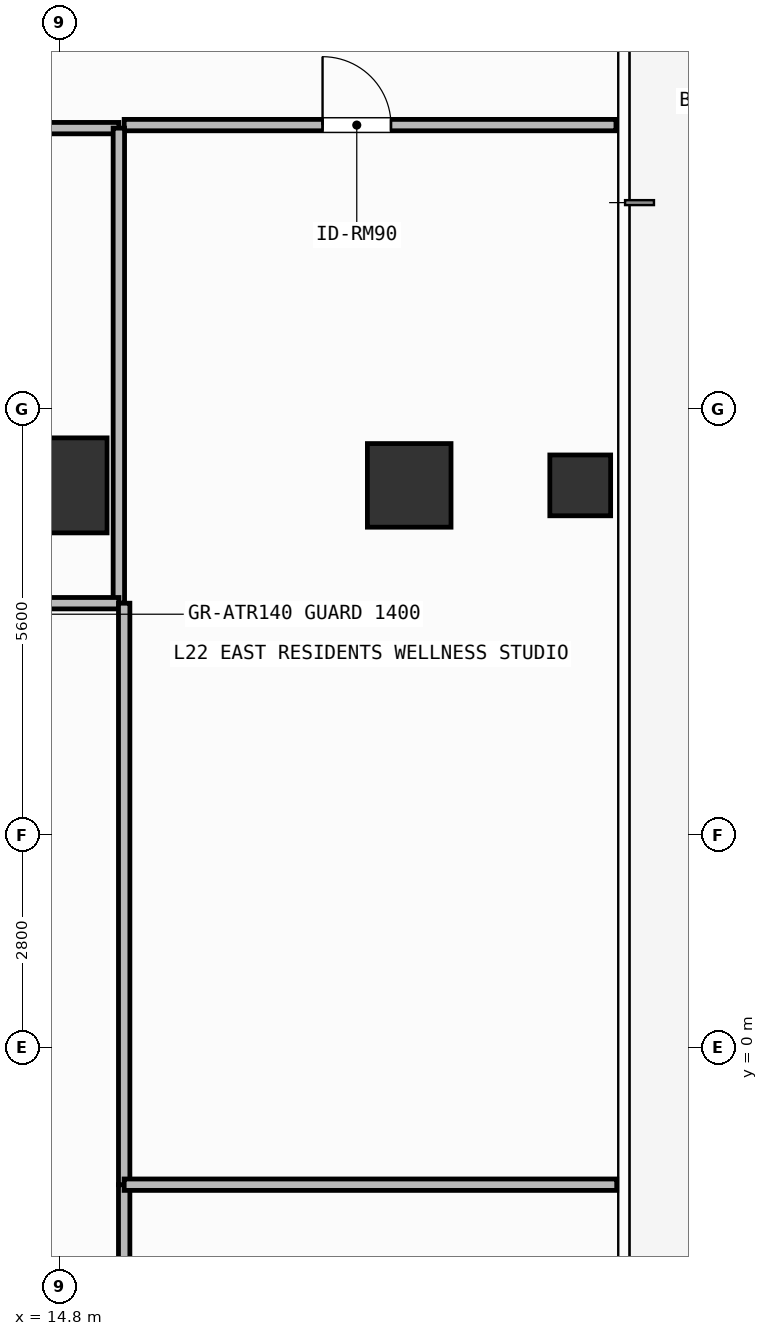
"""IFC4 building model, lengths in metres.
Left out: names, types, materials, properties, quantities, classifications, styles, units other than length and angle.
Written with IfcOpenShell. Run it as: python <this file> out.ifc"""

import sys

from ifc_helpers import new_model, si_unit, direction, frame, frame_2d, origin, origin_2d, place, context, subcontext, project, spatial, rectangle, hollow_rectangle, extrude, element, fill, save


model = new_model("IFC4")
c1 = context("Model", 3, precision=1e-05, world=origin(), true_north=direction((0.0, 1.0)))
c2 = subcontext(c1, "Body", "Model", "MODEL_VIEW")
j1 = project(units=[si_unit("LENGTHUNIT", "METRE"), si_unit("PLANEANGLEUNIT", "RADIAN")], contexts=[c1])
p1 = place(None, origin())
s1 = spatial("IfcSite", under=j1, at=p1, CompositionType="ELEMENT")
p2 = place(p1, origin())
s2 = spatial("IfcBuilding", under=s1, at=p2, CompositionType="ELEMENT")
p3 = place(p2, frame((0.0, 0.0, 89.1)))
s3 = spatial("IfcBuildingStorey", under=s2, at=p3, CompositionType="ELEMENT", Elevation=89.1)
p4 = place(p3, frame((14.8, 7.4, 0.0), z_axis=(0.0, 0.0, 1.0), x_axis=(1.0, 0.0, 0.0)))
e1 = element("IfcColumn", 1, at=p4, inside=s3, PredefinedType="COLUMN", context=c2, shape_type="SweptSolid", body=[
    extrude(rectangle(XDim=1.25, YDim=1.25, at=origin_2d()), origin(), (0.0, 0.0, 1.0), 3.9),
])
p5 = place(p3, frame((19.4, 7.4, 0.0), z_axis=(0.0, 0.0, 1.0), x_axis=(1.0, 0.0, 0.0)))
e2 = element("IfcColumn", 2, at=p5, inside=s3, PredefinedType="COLUMN", context=c2, shape_type="SweptSolid", body=[
    extrude(rectangle(XDim=1.1, YDim=1.1, at=origin_2d()), origin(), (0.0, 0.0, 1.0), 3.9),
])
p6 = place(p3, frame((21.65, 7.4, 0.0), z_axis=(0.0, 0.0, 1.0), x_axis=(1.0, 0.0, 0.0)))
e3 = element("IfcColumn", 3, at=p6, inside=s3, PredefinedType="COLUMN", context=c2, shape_type="SweptSolid", body=[
    extrude(hollow_rectangle(XDim=0.8, YDim=0.8, WallThickness=0.036, at=origin_2d()), origin(), (0.0, 0.0, 1.0), 3.9),
])
p7 = place(p3, frame((8.36, 12.1, 0.0), z_axis=(0.0, 0.0, 1.0), x_axis=(1.0, 0.0, 0.0)))
e4 = element("IfcWall", 4, at=p7, inside=s3, PredefinedType="PARTITIONING", context=c2, shape_type="SweptSolid", body=[
    extrude(rectangle(XDim=7.22, YDim=0.15, at=frame_2d((3.61, 0.0))), origin(), (0.0, 0.0, 1.0), 3.68),
])
p8 = place(p7, frame((3.513, 0.0, 0.0)))
e5 = element("IfcOpeningElement", 5, at=p8, cuts=e4, PredefinedType="OPENING", context=c2, shape_type="SweptSolid", body=[
    extrude(rectangle(XDim=0.9, YDim=2.1, at=frame_2d((0.45, 1.05))), frame((0.0, 0.085, 0.0), z_axis=(0.0, -1.0, 0.0), x_axis=(1.0, 0.0, 0.0)), (0.0, 0.0, 1.0), 0.17),
])
p9 = place(p3, frame((15.65, 12.14, 0.0), z_axis=(0.0, 0.0, 1.0), x_axis=(1.0, 0.0, 0.0)))
e6 = element("IfcWall", 6, at=p9, inside=s3, PredefinedType="PARTITIONING", context=c2, shape_type="SweptSolid", body=[
    extrude(rectangle(XDim=6.47, YDim=0.15, at=frame_2d((3.235, 0.0))), origin(), (0.0, 0.0, 1.0), 3.68),
])
p10 = place(p9, frame((2.61, 0.0, 0.0)))
e7 = element("IfcOpeningElement", 7, at=p10, cuts=e6, PredefinedType="OPENING", context=c2, shape_type="SweptSolid", body=[
    extrude(rectangle(XDim=0.9, YDim=2.1, at=frame_2d((0.45, 1.05))), frame((0.0, 0.085, 0.0), z_axis=(0.0, -1.0, 0.0), x_axis=(1.0, 0.0, 0.0)), (0.0, 0.0, 1.0), 0.17),
])
p11 = place(p3, frame((15.58, 5.85, 0.0), z_axis=(0.0, 0.0, 1.0), x_axis=(0.0, 1.0, 0.0)))
e8 = element("IfcWall", 8, at=p11, inside=s3, PredefinedType="PARTITIONING", context=c2, shape_type="SweptSolid", body=[
    extrude(rectangle(XDim=6.25, YDim=0.15, at=frame_2d((3.125, 0.0))), origin(), (0.0, 0.0, 1.0), 3.68),
])
p12 = place(p3, frame((8.96, 5.85, 0.0), z_axis=(0.0, 0.0, 1.0), x_axis=(1.0, 0.0, 0.0)))
e9 = element("IfcWall", 9, at=p12, inside=s3, PredefinedType="PARTITIONING", context=c2, shape_type="SweptSolid", body=[
    extrude(rectangle(XDim=6.62, YDim=0.15, at=frame_2d((3.31, 0.0))), origin(), (0.0, 0.0, 1.0), 3.68),
])
p13 = place(p3, frame((15.65, -5.85, 0.0), z_axis=(0.0, 0.0, 1.0), x_axis=(0.0, 1.0, 0.0)))
e10 = element("IfcWall", 10, at=p13, inside=s3, PredefinedType="PARTITIONING", context=c2, shape_type="SweptSolid", body=[
    extrude(rectangle(XDim=4.05, YDim=0.15, at=frame_2d((2.025, 0.0))), origin(), (0.0, 0.0, 1.0), 3.68),
])
p14 = place(p3, frame((15.65, -1.8, 0.0), z_axis=(0.0, 0.0, 1.0), x_axis=(0.0, 1.0, 0.0)))
e11 = element("IfcWall", 11, at=p14, inside=s3, PredefinedType="PARTITIONING", context=c2, shape_type="SweptSolid", body=[
    extrude(rectangle(XDim=7.65, YDim=0.15, at=frame_2d((3.825, 0.0))), origin(), (0.0, 0.0, 1.0), 3.68),
])
p15 = place(p3, frame((15.65, -1.8, 0.0), z_axis=(0.0, 0.0, 1.0), x_axis=(1.0, 0.0, 0.0)))
e12 = element("IfcWall", 12, at=p15, inside=s3, PredefinedType="PARTITIONING", context=c2, shape_type="SweptSolid", body=[
    extrude(rectangle(XDim=6.48, YDim=0.15, at=frame_2d((3.24, 0.0))), origin(), (0.0, 0.0, 1.0), 3.68),
])
p16 = place(p10, origin())
e13 = element("IfcDoor", 13, at=p16, inside=s3, OperationType="SINGLE_SWING_LEFT", PredefinedType="DOOR", context=c2, shape_type="SweptSolid", body=[
    extrude(rectangle(XDim=0.9, YDim=2.1, at=frame_2d((0.45, 1.05))), frame((0.0, 0.025, 0.0), z_axis=(0.0, -1.0, 0.0), x_axis=(1.0, 0.0, 0.0)), (0.0, 0.0, 1.0), 0.05),
])
fill(e7, e13)
save(model, sys.argv[1])
